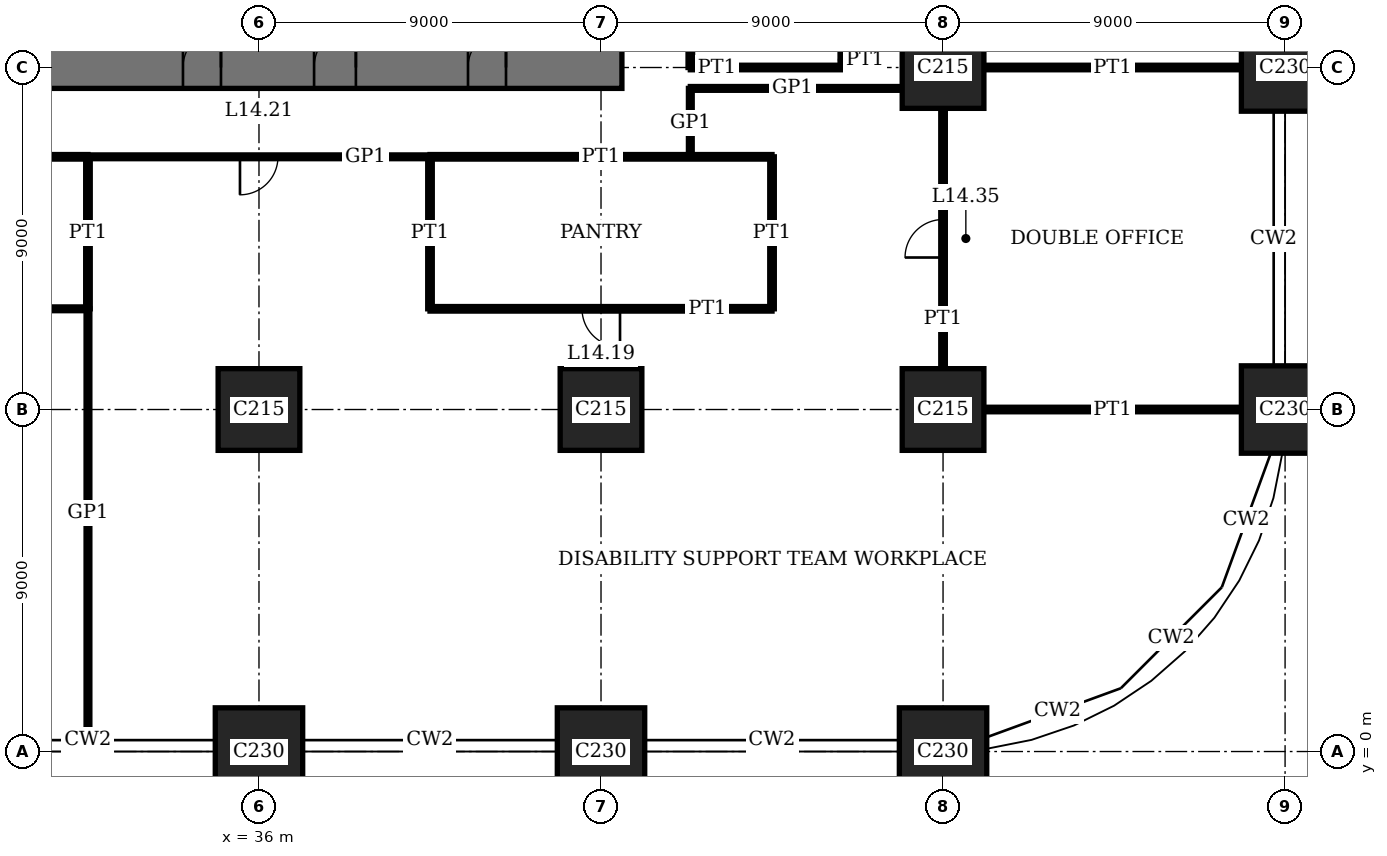
"""IFC4 building model, lengths in metres.
Left out: names, types, materials, properties, quantities, classifications, styles, units other than length and angle.
Written with IfcOpenShell. Run it as: python <this file> out.ifc"""

import sys

from ifc_helpers import new_model, si_unit, direction, frame, frame_2d, origin, origin_2d, place, context, subcontext, project, spatial, rectangle, extrude, element, fill, save


model = new_model("IFC4")
c1 = context("Model", 3, precision=1e-05, world=origin(), true_north=direction((0.0, 1.0)))
c2 = subcontext(c1, "Body", "Model", "MODEL_VIEW")
j1 = project(units=[si_unit("LENGTHUNIT", "METRE"), si_unit("PLANEANGLEUNIT", "RADIAN")], contexts=[c1])
p1 = place(None, origin())
s1 = spatial("IfcSite", under=j1, at=p1, CompositionType="ELEMENT")
p2 = place(p1, origin())
s2 = spatial("IfcBuilding", under=s1, at=p2, CompositionType="ELEMENT")
p3 = place(p2, frame((0.0, 0.0, 59.8)))
s3 = spatial("IfcBuildingStorey", under=s2, at=p3, CompositionType="ELEMENT", Elevation=59.8)
p4 = place(p3, frame((36.0, 0.0, 0.0), z_axis=(0.0, 0.0, 1.0), x_axis=(1.0, 0.0, 0.0)))
e1 = element("IfcColumn", 1, at=p4, inside=s3, PredefinedType="COLUMN", context=c2, shape_type="SweptSolid", body=[
    extrude(rectangle(XDim=2.3, YDim=2.3, at=origin_2d()), origin(), (0.0, 0.0, 1.0), 4.0),
])
p5 = place(p3, frame((36.0, 9.0, 0.0), z_axis=(0.0, 0.0, 1.0), x_axis=(1.0, 0.0, 0.0)))
e2 = element("IfcColumn", 2, at=p5, inside=s3, PredefinedType="COLUMN", context=c2, shape_type="SweptSolid", body=[
    extrude(rectangle(XDim=2.15, YDim=2.15, at=origin_2d()), origin(), (0.0, 0.0, 1.0), 4.0),
])
p6 = place(p3, frame((45.0, 0.0, 0.0), z_axis=(0.0, 0.0, 1.0), x_axis=(1.0, 0.0, 0.0)))
e3 = element("IfcColumn", 3, at=p6, inside=s3, PredefinedType="COLUMN", context=c2, shape_type="SweptSolid", body=[
    extrude(rectangle(XDim=2.3, YDim=2.3, at=origin_2d()), origin(), (0.0, 0.0, 1.0), 4.0),
])
p7 = place(p3, frame((45.0, 9.0, 0.0), z_axis=(0.0, 0.0, 1.0), x_axis=(1.0, 0.0, 0.0)))
e4 = element("IfcColumn", 4, at=p7, inside=s3, PredefinedType="COLUMN", context=c2, shape_type="SweptSolid", body=[
    extrude(rectangle(XDim=2.15, YDim=2.15, at=origin_2d()), origin(), (0.0, 0.0, 1.0), 4.0),
])
p8 = place(p3, frame((54.0, 0.0, 0.0), z_axis=(0.0, 0.0, 1.0), x_axis=(1.0, 0.0, 0.0)))
e5 = element("IfcColumn", 5, at=p8, inside=s3, PredefinedType="COLUMN", context=c2, shape_type="SweptSolid", body=[
    extrude(rectangle(XDim=2.3, YDim=2.3, at=origin_2d()), origin(), (0.0, 0.0, 1.0), 4.0),
])
for number, where, z_axis, x_axis in (
    (6, (54.0, 9.0, 0.0), (0.0, 0.0, 1.0), (1.0, 0.0, 0.0)),
    (7, (54.0, 18.0, 0.0), (0.0, 0.0, 1.0), (1.0, 0.0, 0.0)),
):
    element("IfcColumn", number, at=place(p3, frame(where, z_axis=z_axis, x_axis=x_axis)), inside=s3, PredefinedType="COLUMN", context=c2, shape_type="SweptSolid", body=[
        extrude(rectangle(XDim=2.15, YDim=2.15, at=origin_2d()), origin(), (0.0, 0.0, 1.0), 4.0),
    ])
for number, where, z_axis, x_axis in (
    (8, (63.0, 9.0, 0.0), (0.0, 0.0, 1.0), (1.0, 0.0, 0.0)),
    (9, (63.0, 18.0, 0.0), (0.0, 0.0, 1.0), (1.0, 0.0, 0.0)),
):
    element("IfcColumn", number, at=place(p3, frame(where, z_axis=z_axis, x_axis=x_axis)), inside=s3, PredefinedType="COLUMN", context=c2, shape_type="SweptSolid", body=[
        extrude(rectangle(XDim=2.3, YDim=2.3, at=origin_2d()), origin(), (0.0, 0.0, 1.0), 4.0),
    ])
p9 = place(p3, frame((17.45, 18.0, 0.0), z_axis=(0.0, 0.0, 1.0), x_axis=(1.0, 0.0, 0.0)))
e10 = element("IfcWall", 10, at=p9, inside=s3, PredefinedType="SHEAR", context=c2, shape_type="SweptSolid", body=[
    extrude(rectangle(XDim=28.1, YDim=1.1, at=frame_2d((14.05, 0.0))), origin(), (0.0, 0.0, 1.0), 4.0),
])
p10 = place(p9, frame((11.55, 0.0, 0.0)))
e11 = element("IfcOpeningElement", 11, at=p10, cuts=e10, PredefinedType="OPENING", context=c2, shape_type="SweptSolid", body=[
    extrude(rectangle(XDim=1.0, YDim=2.4, at=frame_2d((0.5, 1.2))), frame((0.0, 0.56, 0.0), z_axis=(0.0, -1.0, 0.0), x_axis=(1.0, 0.0, 0.0)), (0.0, 0.0, 1.0), 1.12),
])
p11 = place(p9, frame((16.55, 0.0, 0.0)))
e12 = element("IfcOpeningElement", 12, at=p11, cuts=e10, PredefinedType="OPENING", context=c2, shape_type="SweptSolid", body=[
    extrude(rectangle(XDim=1.0, YDim=2.4, at=frame_2d((0.5, 1.2))), frame((0.0, 0.56, 0.0), z_axis=(0.0, -1.0, 0.0), x_axis=(1.0, 0.0, 0.0)), (0.0, 0.0, 1.0), 1.12),
])
p12 = place(p9, frame((20.0, 0.0, 0.0)))
e13 = element("IfcOpeningElement", 13, at=p12, cuts=e10, PredefinedType="OPENING", context=c2, shape_type="SweptSolid", body=[
    extrude(rectangle(XDim=1.1, YDim=2.4, at=frame_2d((0.55, 1.2))), frame((0.0, 0.56, 0.0), z_axis=(0.0, -1.0, 0.0), x_axis=(1.0, 0.0, 0.0)), (0.0, 0.0, 1.0), 1.12),
])
p13 = place(p9, frame((24.05, 0.0, 0.0)))
e14 = element("IfcOpeningElement", 14, at=p13, cuts=e10, PredefinedType="OPENING", context=c2, shape_type="SweptSolid", body=[
    extrude(rectangle(XDim=1.0, YDim=2.4, at=frame_2d((0.5, 1.2))), frame((0.0, 0.56, 0.0), z_axis=(0.0, -1.0, 0.0), x_axis=(1.0, 0.0, 0.0)), (0.0, 0.0, 1.0), 1.12),
])
p14 = place(p3, frame((55.075, 9.0, 0.0), z_axis=(0.0, 0.0, 1.0), x_axis=(1.0, 0.0, 0.0)))
e15 = element("IfcWall", 15, at=p14, inside=s3, PredefinedType="PARTITIONING", context=c2, shape_type="SweptSolid", body=[
    extrude(rectangle(XDim=6.775, YDim=0.12, at=frame_2d((3.388, 0.0))), origin(), (0.0, 0.0, 1.0), 3.05),
])
p15 = place(p3, frame((40.5, 11.65, 0.0), z_axis=(0.0, 0.0, 1.0), x_axis=(1.0, 0.0, 0.0)))
e16 = element("IfcWall", 16, at=p15, inside=s3, PredefinedType="PARTITIONING", context=c2, shape_type="SweptSolid", body=[
    extrude(rectangle(XDim=9.0, YDim=0.12, at=frame_2d((4.5, 0.0))), origin(), (0.0, 0.0, 1.0), 3.75),
])
p16 = place(p15, frame((4.0, 0.0, 0.0)))
e17 = element("IfcOpeningElement", 17, at=p16, cuts=e16, PredefinedType="OPENING", context=c2, shape_type="SweptSolid", body=[
    extrude(rectangle(XDim=1.0, YDim=2.4, at=frame_2d((0.5, 1.2))), frame((0.0, 0.07, 0.0), z_axis=(0.0, -1.0, 0.0), x_axis=(1.0, 0.0, 0.0)), (0.0, 0.0, 1.0), 0.14),
])
p17 = place(p3, frame((22.5, 11.65, 0.0), z_axis=(0.0, 0.0, 1.0), x_axis=(1.0, 0.0, 0.0)))
e18 = element("IfcWall", 18, at=p17, inside=s3, PredefinedType="PARTITIONING", context=c2, shape_type="SweptSolid", body=[
    extrude(rectangle(XDim=9.0, YDim=0.1, at=frame_2d((4.5, 0.0))), origin(), (0.0, 0.0, 1.0), 3.75),
])
p18 = place(p17, frame((4.0, 0.0, 0.0)))
e19 = element("IfcOpeningElement", 19, at=p18, cuts=e18, PredefinedType="OPENING", context=c2, shape_type="SweptSolid", body=[
    extrude(rectangle(XDim=1.0, YDim=2.4, at=frame_2d((0.5, 1.2))), frame((0.0, 0.06, 0.0), z_axis=(0.0, -1.0, 0.0), x_axis=(1.0, 0.0, 0.0)), (0.0, 0.0, 1.0), 0.12),
])
for number, where, z_axis, x_axis in (
    (20, (22.5, 15.65, 0.0), (0.0, 0.0, 1.0), (1.0, 0.0, 0.0)),
    (21, (40.5, 15.65, 0.0), (0.0, 0.0, 1.0), (1.0, 0.0, 0.0)),
):
    element("IfcWall", number, at=place(p3, frame(where, z_axis=z_axis, x_axis=x_axis)), inside=s3, PredefinedType="PARTITIONING", context=c2, shape_type="SweptSolid", body=[
        extrude(rectangle(XDim=9.0, YDim=0.12, at=frame_2d((4.5, 0.0))), origin(), (0.0, 0.0, 1.0), 3.75),
    ])
p19 = place(p3, frame((31.5, 15.65, 0.0), z_axis=(0.0, 0.0, 1.0), x_axis=(1.0, 0.0, 0.0)))
e22 = element("IfcWall", 22, at=p19, inside=s3, PredefinedType="PARTITIONING", context=c2, shape_type="SweptSolid", body=[
    extrude(rectangle(XDim=9.0, YDim=0.1, at=frame_2d((4.5, 0.0))), origin(), (0.0, 0.0, 1.0), 3.75),
])
p20 = place(p19, frame((4.0, 0.0, 0.0)))
e23 = element("IfcOpeningElement", 23, at=p20, cuts=e22, PredefinedType="OPENING", context=c2, shape_type="SweptSolid", body=[
    extrude(rectangle(XDim=1.0, YDim=2.4, at=frame_2d((0.5, 1.2))), frame((0.0, 0.06, 0.0), z_axis=(0.0, -1.0, 0.0), x_axis=(1.0, 0.0, 0.0)), (0.0, 0.0, 1.0), 0.12),
])
p21 = place(p3, frame((47.35, 17.45, 0.0), z_axis=(0.0, 0.0, 1.0), x_axis=(1.0, 0.0, 0.0)))
e24 = element("IfcWall", 24, at=p21, inside=s3, PredefinedType="PARTITIONING", context=c2, shape_type="SweptSolid", body=[
    extrude(rectangle(XDim=5.575, YDim=0.1, at=frame_2d((2.788, 0.0))), origin(), (0.0, 0.0, 1.0), 3.75),
])
p22 = place(p3, frame((47.35, 18.0, 0.0), z_axis=(0.0, 0.0, 1.0), x_axis=(1.0, 0.0, 0.0)))
e25 = element("IfcWall", 25, at=p22, inside=s3, PredefinedType="PARTITIONING", context=c2, shape_type="SweptSolid", body=[
    extrude(rectangle(XDim=4.0, YDim=0.12, at=frame_2d((2.0, 0.0))), origin(), (0.0, 0.0, 1.0), 3.05),
])
p23 = place(p3, frame((55.075, 18.0, 0.0), z_axis=(0.0, 0.0, 1.0), x_axis=(1.0, 0.0, 0.0)))
e26 = element("IfcWall", 26, at=p23, inside=s3, PredefinedType="PARTITIONING", context=c2, shape_type="SweptSolid", body=[
    extrude(rectangle(XDim=6.775, YDim=0.12, at=frame_2d((3.388, 0.0))), origin(), (0.0, 0.0, 1.0), 3.05),
])
p24 = place(p3, frame((31.5, 11.65, 0.0), z_axis=(0.0, 0.0, 1.0), x_axis=(0.0, 1.0, 0.0)))
e27 = element("IfcWall", 27, at=p24, inside=s3, PredefinedType="PARTITIONING", context=c2, shape_type="SweptSolid", body=[
    extrude(rectangle(XDim=4.0, YDim=0.12, at=frame_2d((2.0, 0.0))), origin(), (0.0, 0.0, 1.0), 3.75),
])
p25 = place(p3, frame((31.5, 0.31, 0.0), z_axis=(0.0, 0.0, 1.0), x_axis=(0.0, 1.0, 0.0)))
e28 = element("IfcWall", 28, at=p25, inside=s3, PredefinedType="PARTITIONING", context=c2, shape_type="SweptSolid", body=[
    extrude(rectangle(XDim=11.34, YDim=0.1, at=frame_2d((5.67, 0.0))), origin(), (0.0, 0.0, 1.0), 3.75),
])
p26 = place(p3, frame((40.5, 11.65, 0.0), z_axis=(0.0, 0.0, 1.0), x_axis=(0.0, 1.0, 0.0)))
e29 = element("IfcWall", 29, at=p26, inside=s3, PredefinedType="PARTITIONING", context=c2, shape_type="SweptSolid", body=[
    extrude(rectangle(XDim=4.0, YDim=0.12, at=frame_2d((2.0, 0.0))), origin(), (0.0, 0.0, 1.0), 3.75),
])
p27 = place(p3, frame((47.35, 18.0, 0.0), z_axis=(0.0, 0.0, 1.0), x_axis=(0.0, 1.0, 0.0)))
e30 = element("IfcWall", 30, at=p27, inside=s3, PredefinedType="PARTITIONING", context=c2, shape_type="SweptSolid", body=[
    extrude(rectangle(XDim=4.5, YDim=0.12, at=frame_2d((2.25, 0.0))), origin(), (0.0, 0.0, 1.0), 3.75),
])
p28 = place(p3, frame((47.35, 15.65, 0.0), z_axis=(0.0, 0.0, 1.0), x_axis=(0.0, 1.0, 0.0)))
e31 = element("IfcWall", 31, at=p28, inside=s3, PredefinedType="PARTITIONING", context=c2, shape_type="SweptSolid", body=[
    extrude(rectangle(XDim=1.8, YDim=0.1, at=frame_2d((0.9, 0.0))), origin(), (0.0, 0.0, 1.0), 3.75),
])
p29 = place(p3, frame((49.5, 11.65, 0.0), z_axis=(0.0, 0.0, 1.0), x_axis=(0.0, 1.0, 0.0)))
e32 = element("IfcWall", 32, at=p29, inside=s3, PredefinedType="PARTITIONING", context=c2, shape_type="SweptSolid", body=[
    extrude(rectangle(XDim=4.0, YDim=0.12, at=frame_2d((2.0, 0.0))), origin(), (0.0, 0.0, 1.0), 3.75),
])
p30 = place(p3, frame((51.35, 18.0, 0.0), z_axis=(0.0, 0.0, 1.0), x_axis=(0.0, 1.0, 0.0)))
e33 = element("IfcWall", 33, at=p30, inside=s3, PredefinedType="PARTITIONING", context=c2, shape_type="SweptSolid", body=[
    extrude(rectangle(XDim=4.5, YDim=0.12, at=frame_2d((2.25, 0.0))), origin(), (0.0, 0.0, 1.0), 3.75),
])
p31 = place(p30, frame((1.75, 0.0, 0.0)))
e34 = element("IfcOpeningElement", 34, at=p31, cuts=e33, PredefinedType="OPENING", context=c2, shape_type="SweptSolid", body=[
    extrude(rectangle(XDim=1.0, YDim=2.4, at=frame_2d((0.5, 1.2))), frame((0.0, 0.07, 0.0), z_axis=(0.0, -1.0, 0.0), x_axis=(1.0, 0.0, 0.0)), (0.0, 0.0, 1.0), 0.14),
])
p32 = place(p3, frame((54.0, 10.075, 0.0), z_axis=(0.0, 0.0, 1.0), x_axis=(0.0, 1.0, 0.0)))
e35 = element("IfcWall", 35, at=p32, inside=s3, PredefinedType="PARTITIONING", context=c2, shape_type="SweptSolid", body=[
    extrude(rectangle(XDim=6.85, YDim=0.12, at=frame_2d((3.425, 0.0))), origin(), (0.0, 0.0, 1.0), 3.05),
])
p33 = place(p32, frame((2.925, 0.0, 0.0)))
e36 = element("IfcOpeningElement", 36, at=p33, cuts=e35, PredefinedType="OPENING", context=c2, shape_type="SweptSolid", body=[
    extrude(rectangle(XDim=1.0, YDim=2.4, at=frame_2d((0.5, 1.2))), frame((0.0, 0.07, 0.0), z_axis=(0.0, -1.0, 0.0), x_axis=(1.0, 0.0, 0.0)), (0.0, 0.0, 1.0), 0.14),
])
p34 = place(p11, origin())
e37 = element("IfcDoor", 37, at=p34, inside=s3, OperationType="SINGLE_SWING_LEFT", PredefinedType="DOOR", context=c2, shape_type="SweptSolid", body=[
    extrude(rectangle(XDim=1.0, YDim=2.4, at=frame_2d((0.5, 1.2))), frame((0.0, 0.025, 0.0), z_axis=(0.0, -1.0, 0.0), x_axis=(1.0, 0.0, 0.0)), (0.0, 0.0, 1.0), 0.05),
    extrude(rectangle(XDim=0.04, YDim=2.4, at=frame_2d((0.02, 1.2))), frame((0.0, 0.4, 0.0), z_axis=(0.0, -1.0, 0.0), x_axis=(1.0, 0.0, 0.0)), (0.0, 0.0, 1.0), 0.8),
    extrude(rectangle(XDim=0.04, YDim=2.4, at=frame_2d((0.98, 1.2))), frame((0.0, 0.4, 0.0), z_axis=(0.0, -1.0, 0.0), x_axis=(1.0, 0.0, 0.0)), (0.0, 0.0, 1.0), 0.8),
    extrude(rectangle(XDim=1.0, YDim=0.04, at=frame_2d((0.5, 2.38))), frame((0.0, 0.4, 0.0), z_axis=(0.0, -1.0, 0.0), x_axis=(1.0, 0.0, 0.0)), (0.0, 0.0, 1.0), 0.8),
])
fill(e12, e37)
p35 = place(p12, origin())
e38 = element("IfcDoor", 38, at=p35, inside=s3, OperationType="SINGLE_SWING_LEFT", PredefinedType="DOOR", context=c2, shape_type="SweptSolid", body=[
    extrude(rectangle(XDim=1.1, YDim=2.4, at=frame_2d((0.55, 1.2))), frame((0.0, 0.025, 0.0), z_axis=(0.0, -1.0, 0.0), x_axis=(1.0, 0.0, 0.0)), (0.0, 0.0, 1.0), 0.05),
    extrude(rectangle(XDim=0.04, YDim=2.4, at=frame_2d((0.02, 1.2))), frame((0.0, 0.44, 0.0), z_axis=(0.0, -1.0, 0.0), x_axis=(1.0, 0.0, 0.0)), (0.0, 0.0, 1.0), 0.88),
    extrude(rectangle(XDim=0.04, YDim=2.4, at=frame_2d((1.08, 1.2))), frame((0.0, 0.44, 0.0), z_axis=(0.0, -1.0, 0.0), x_axis=(1.0, 0.0, 0.0)), (0.0, 0.0, 1.0), 0.88),
    extrude(rectangle(XDim=1.1, YDim=0.04, at=frame_2d((0.55, 2.38))), frame((0.0, 0.44, 0.0), z_axis=(0.0, -1.0, 0.0), x_axis=(1.0, 0.0, 0.0)), (0.0, 0.0, 1.0), 0.88),
])
fill(e13, e38)
p36 = place(p13, origin())
e39 = element("IfcDoor", 39, at=p36, inside=s3, OperationType="SINGLE_SWING_LEFT", PredefinedType="DOOR", context=c2, shape_type="SweptSolid", body=[
    extrude(rectangle(XDim=1.0, YDim=2.4, at=frame_2d((0.5, 1.2))), frame((0.0, 0.025, 0.0), z_axis=(0.0, -1.0, 0.0), x_axis=(1.0, 0.0, 0.0)), (0.0, 0.0, 1.0), 0.05),
    extrude(rectangle(XDim=0.04, YDim=2.4, at=frame_2d((0.02, 1.2))), frame((0.0, 0.4, 0.0), z_axis=(0.0, -1.0, 0.0), x_axis=(1.0, 0.0, 0.0)), (0.0, 0.0, 1.0), 0.8),
    extrude(rectangle(XDim=0.04, YDim=2.4, at=frame_2d((0.98, 1.2))), frame((0.0, 0.4, 0.0), z_axis=(0.0, -1.0, 0.0), x_axis=(1.0, 0.0, 0.0)), (0.0, 0.0, 1.0), 0.8),
    extrude(rectangle(XDim=1.0, YDim=0.04, at=frame_2d((0.5, 2.38))), frame((0.0, 0.4, 0.0), z_axis=(0.0, -1.0, 0.0), x_axis=(1.0, 0.0, 0.0)), (0.0, 0.0, 1.0), 0.8),
])
fill(e14, e39)
p37 = place(p16, origin())
e40 = element("IfcDoor", 40, at=p37, inside=s3, OperationType="SINGLE_SWING_RIGHT", PredefinedType="DOOR", context=c2, shape_type="SweptSolid", body=[
    extrude(rectangle(XDim=1.0, YDim=2.4, at=frame_2d((0.5, 1.2))), frame((0.0, 0.025, 0.0), z_axis=(0.0, -1.0, 0.0), x_axis=(1.0, 0.0, 0.0)), (0.0, 0.0, 1.0), 0.05),
])
fill(e17, e40)
p38 = place(p20, origin())
e41 = element("IfcDoor", 41, at=p38, inside=s3, OperationType="SINGLE_SWING_LEFT", PredefinedType="DOOR", context=c2, shape_type="SweptSolid", body=[
    extrude(rectangle(XDim=1.0, YDim=2.4, at=frame_2d((0.5, 1.2))), frame((0.0, 0.02, 0.0), z_axis=(0.0, -1.0, 0.0), x_axis=(1.0, 0.0, 0.0)), (0.0, 0.0, 1.0), 0.04),
])
fill(e23, e41)
p39 = place(p33, origin())
e42 = element("IfcDoor", 42, at=p39, inside=s3, OperationType="SINGLE_SWING_RIGHT", PredefinedType="DOOR", context=c2, shape_type="SweptSolid", body=[
    extrude(rectangle(XDim=1.0, YDim=2.4, at=frame_2d((0.5, 1.2))), frame((0.0, 0.025, 0.0), z_axis=(0.0, -1.0, 0.0), x_axis=(1.0, 0.0, 0.0)), (0.0, 0.0, 1.0), 0.05),
])
fill(e36, e42)
save(model, sys.argv[1])
